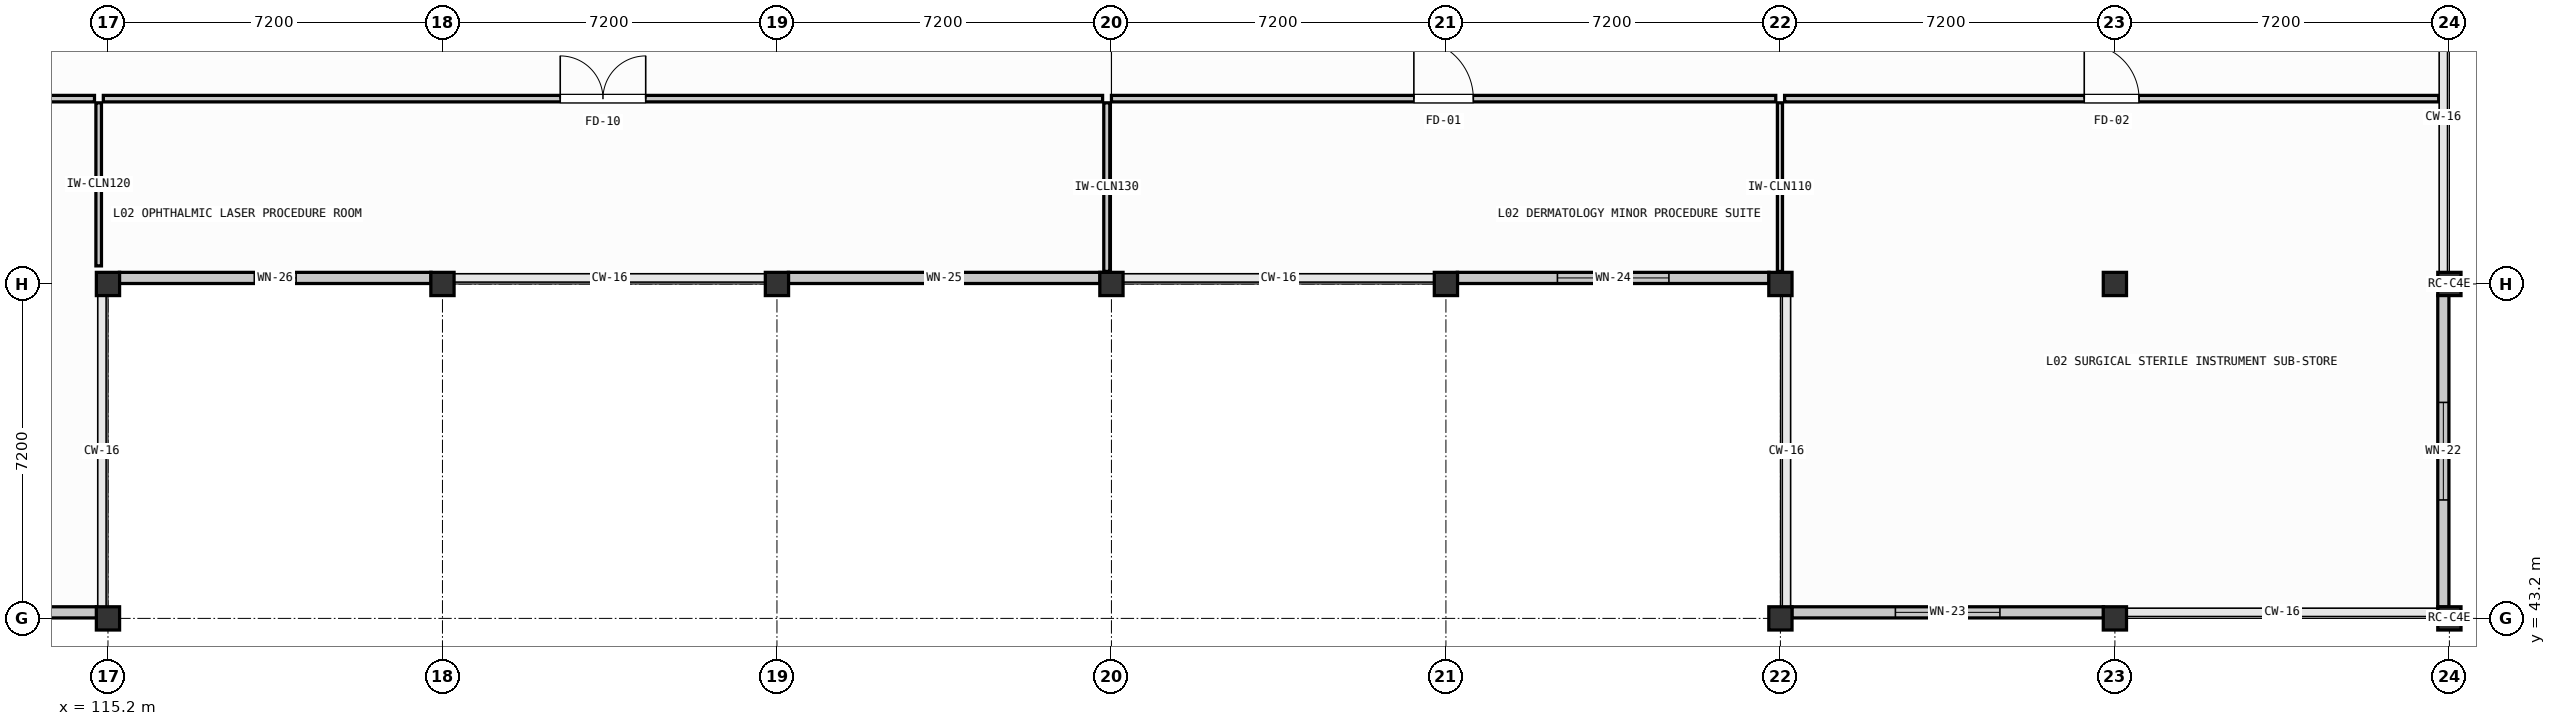
"""IFC4 building model, lengths in metres.
Left out: names, types, materials, properties, quantities, classifications, styles, units other than length and angle.
Written with IfcOpenShell. Run it as: python <this file> out.ifc"""

import sys

from ifc_helpers import new_model, si_unit, direction, frame, frame_2d, origin, origin_2d, place, context, subcontext, project, spatial, rectangle, extrude, element, fill, save


model = new_model("IFC4")
c1 = context("Model", 3, precision=1e-05, world=origin(), true_north=direction((0.0, 1.0)))
c2 = subcontext(c1, "Body", "Model", "MODEL_VIEW")
j1 = project(units=[si_unit("LENGTHUNIT", "METRE"), si_unit("PLANEANGLEUNIT", "RADIAN")], contexts=[c1])
p1 = place(None, origin())
s1 = spatial("IfcSite", under=j1, at=p1, CompositionType="ELEMENT")
p2 = place(p1, origin())
s2 = spatial("IfcBuilding", under=s1, at=p2, CompositionType="ELEMENT")
p3 = place(p2, frame((0.0, 0.0, 4.8)))
s3 = spatial("IfcBuildingStorey", under=s2, at=p3, CompositionType="ELEMENT", Elevation=4.8)
for number, where, z_axis, x_axis in (
    (1, (115.2, 43.2, 0.0), (0.0, 0.0, 1.0), (1.0, 0.0, 0.0)),
    (2, (115.2, 50.4, 0.0), (0.0, 0.0, 1.0), (1.0, 0.0, 0.0)),
    (3, (122.4, 50.4, 0.0), (0.0, 0.0, 1.0), (1.0, 0.0, 0.0)),
    (4, (129.6, 50.4, 0.0), (0.0, 0.0, 1.0), (1.0, 0.0, 0.0)),
    (5, (136.8, 50.4, 0.0), (0.0, 0.0, 1.0), (1.0, 0.0, 0.0)),
    (6, (144.0, 50.4, 0.0), (0.0, 0.0, 1.0), (1.0, 0.0, 0.0)),
    (7, (151.2, 43.2, 0.0), (0.0, 0.0, 1.0), (1.0, 0.0, 0.0)),
    (8, (151.2, 50.4, 0.0), (0.0, 0.0, 1.0), (1.0, 0.0, 0.0)),
    (9, (158.4, 43.2, 0.0), (0.0, 0.0, 1.0), (1.0, 0.0, 0.0)),
    (10, (158.4, 50.4, 0.0), (0.0, 0.0, 1.0), (1.0, 0.0, 0.0)),
    (11, (165.6, 43.2, 0.0), (0.0, 0.0, 1.0), (1.0, 0.0, 0.0)),
    (12, (165.6, 50.4, 0.0), (0.0, 0.0, 1.0), (1.0, 0.0, 0.0)),
):
    element("IfcColumn", number, at=place(p3, frame(where, z_axis=z_axis, x_axis=x_axis)), inside=s3, PredefinedType="COLUMN", context=c2, shape_type="SweptSolid", body=[
        extrude(rectangle(XDim=0.5, YDim=0.5, at=origin_2d()), origin(), (0.0, 0.0, 1.0), 4.2),
    ])
p4 = place(p3, frame((165.47, 50.155, 0.0), z_axis=(0.0, 0.0, 1.0), x_axis=(0.0, -1.0, 0.0)))
e13 = element("IfcWall", 13, at=p4, inside=s3, PredefinedType="SOLIDWALL", context=c2, shape_type="SweptSolid", body=[
    extrude(rectangle(XDim=6.71, YDim=0.24, at=frame_2d((3.355, 0.0))), origin(), (0.0, 0.0, 1.0), 3.4),
])
p5 = place(p4, frame((2.305, 0.0, 1.5)))
e14 = element("IfcOpeningElement", 14, at=p5, cuts=e13, PredefinedType="OPENING", context=c2, shape_type="SweptSolid", body=[
    extrude(rectangle(XDim=2.1, YDim=0.95, at=frame_2d((1.05, 0.475))), frame((0.0, 0.13, 0.0), z_axis=(0.0, -1.0, 0.0), x_axis=(1.0, 0.0, 0.0)), (0.0, 0.0, 1.0), 0.26),
])
p6 = place(p3, frame((158.155, 43.33, 0.0), z_axis=(0.0, 0.0, 1.0), x_axis=(-1.0, 0.0, 0.0)))
e15 = element("IfcWall", 15, at=p6, inside=s3, PredefinedType="SOLIDWALL", context=c2, shape_type="SweptSolid", body=[
    extrude(rectangle(XDim=6.71, YDim=0.24, at=frame_2d((3.355, 0.0))), origin(), (0.0, 0.0, 1.0), 3.4),
])
p7 = place(p6, frame((2.23, 0.0, 1.5)))
e16 = element("IfcOpeningElement", 16, at=p7, cuts=e15, PredefinedType="OPENING", context=c2, shape_type="SweptSolid", body=[
    extrude(rectangle(XDim=2.25, YDim=0.95, at=frame_2d((1.125, 0.475))), frame((0.0, 0.13, 0.0), z_axis=(0.0, -1.0, 0.0), x_axis=(1.0, 0.0, 0.0)), (0.0, 0.0, 1.0), 0.26),
])
p8 = place(p3, frame((150.955, 50.53, 0.0), z_axis=(0.0, 0.0, 1.0), x_axis=(-1.0, 0.0, 0.0)))
e17 = element("IfcWall", 17, at=p8, inside=s3, PredefinedType="SOLIDWALL", context=c2, shape_type="SweptSolid", body=[
    extrude(rectangle(XDim=6.71, YDim=0.24, at=frame_2d((3.355, 0.0))), origin(), (0.0, 0.0, 1.0), 3.4),
])
p9 = place(p8, frame((2.155, 0.0, 1.5)))
e18 = element("IfcOpeningElement", 18, at=p9, cuts=e17, PredefinedType="OPENING", context=c2, shape_type="SweptSolid", body=[
    extrude(rectangle(XDim=2.4, YDim=0.95, at=frame_2d((1.2, 0.475))), frame((0.0, 0.13, 0.0), z_axis=(0.0, -1.0, 0.0), x_axis=(1.0, 0.0, 0.0)), (0.0, 0.0, 1.0), 0.26),
])
p10 = place(p3, frame((136.555, 50.53, 0.0), z_axis=(0.0, 0.0, 1.0), x_axis=(-1.0, 0.0, 0.0)))
e19 = element("IfcWall", 19, at=p10, inside=s3, PredefinedType="SOLIDWALL", context=c2, shape_type="SweptSolid", body=[
    extrude(rectangle(XDim=6.71, YDim=0.24, at=frame_2d((3.355, 0.0))), origin(), (0.0, 0.0, 1.0), 3.4),
])
p11 = place(p10, frame((2.98, 0.0, 0.95)))
e20 = element("IfcOpeningElement", 20, at=p11, cuts=e19, PredefinedType="OPENING", context=c2, shape_type="SweptSolid", body=[
    extrude(rectangle(XDim=0.75, YDim=1.25, at=frame_2d((0.375, 0.625))), frame((0.0, 0.13, 0.0), z_axis=(0.0, -1.0, 0.0), x_axis=(1.0, 0.0, 0.0)), (0.0, 0.0, 1.0), 0.26),
])
p12 = place(p3, frame((122.155, 50.53, 0.0), z_axis=(0.0, 0.0, 1.0), x_axis=(-1.0, 0.0, 0.0)))
e21 = element("IfcWall", 21, at=p12, inside=s3, PredefinedType="SOLIDWALL", context=c2, shape_type="SweptSolid", body=[
    extrude(rectangle(XDim=6.71, YDim=0.24, at=frame_2d((3.355, 0.0))), origin(), (0.0, 0.0, 1.0), 3.4),
])
p13 = place(p12, frame((2.905, 0.0, 0.95)))
e22 = element("IfcOpeningElement", 22, at=p13, cuts=e21, PredefinedType="OPENING", context=c2, shape_type="SweptSolid", body=[
    extrude(rectangle(XDim=0.9, YDim=1.25, at=frame_2d((0.45, 0.625))), frame((0.0, 0.13, 0.0), z_axis=(0.0, -1.0, 0.0), x_axis=(1.0, 0.0, 0.0)), (0.0, 0.0, 1.0), 0.26),
])
p14 = place(p3, frame((114.955, 43.33, 0.0), z_axis=(0.0, 0.0, 1.0), x_axis=(-1.0, 0.0, 0.0)))
e23 = element("IfcWall", 23, at=p14, inside=s3, PredefinedType="SOLIDWALL", context=c2, shape_type="SweptSolid", body=[
    extrude(rectangle(XDim=6.71, YDim=0.24, at=frame_2d((3.355, 0.0))), origin(), (0.0, 0.0, 1.0), 3.4),
])
p15 = place(p14, frame((2.83, 0.0, 0.95)))
e24 = element("IfcOpeningElement", 24, at=p15, cuts=e23, PredefinedType="OPENING", context=c2, shape_type="SweptSolid", body=[
    extrude(rectangle(XDim=1.05, YDim=1.25, at=frame_2d((0.525, 0.625))), frame((0.0, 0.13, 0.0), z_axis=(0.0, -1.0, 0.0), x_axis=(1.0, 0.0, 0.0)), (0.0, 0.0, 1.0), 0.26),
])
p16 = place(p3, frame((101.29, 54.39, 0.0), z_axis=(0.0, 0.0, 1.0), x_axis=(1.0, 0.0, 0.0)))
e25 = element("IfcWall", 25, at=p16, inside=s3, PredefinedType="PARTITIONING", context=c2, shape_type="SweptSolid", body=[
    extrude(rectangle(XDim=13.62, YDim=0.14, at=frame_2d((6.81, 0.0))), origin(), (0.0, 0.0, 1.0), 3.5),
])
p17 = place(p16, frame((5.99, 0.0, 0.0)))
e26 = element("IfcOpeningElement", 26, at=p17, cuts=e25, PredefinedType="OPENING", context=c2, shape_type="SweptSolid", body=[
    extrude(rectangle(XDim=1.64, YDim=2.24, at=frame_2d((0.82, 1.12))), frame((0.0, 0.08, 0.0), z_axis=(0.0, -1.0, 0.0), x_axis=(1.0, 0.0, 0.0)), (0.0, 0.0, 1.0), 0.16),
])
p18 = place(p3, frame((115.0, 54.3, 0.0), z_axis=(0.0, 0.0, 1.0), x_axis=(0.0, -1.0, 0.0)))
e27 = element("IfcWall", 27, at=p18, inside=s3, PredefinedType="PARTITIONING", context=c2, shape_type="SweptSolid", body=[
    extrude(rectangle(XDim=3.511, YDim=0.12, at=frame_2d((1.755, 0.0))), origin(), (0.0, 0.0, 1.0), 3.4),
])
p19 = place(p3, frame((115.1, 54.39, 0.0), z_axis=(0.0, 0.0, 1.0), x_axis=(1.0, 0.0, 0.0)))
e28 = element("IfcWall", 28, at=p19, inside=s3, PredefinedType="PARTITIONING", context=c2, shape_type="SweptSolid", body=[
    extrude(rectangle(XDim=21.51, YDim=0.14, at=frame_2d((10.755, 0.0))), origin(), (0.0, 0.0, 1.0), 3.5),
])
p20 = place(p19, frame((9.835, 0.0, 0.0)))
e29 = element("IfcOpeningElement", 29, at=p20, cuts=e28, PredefinedType="OPENING", context=c2, shape_type="SweptSolid", body=[
    extrude(rectangle(XDim=1.84, YDim=2.28, at=frame_2d((0.92, 1.14))), frame((0.0, 0.08, 0.0), z_axis=(0.0, -1.0, 0.0), x_axis=(1.0, 0.0, 0.0)), (0.0, 0.0, 1.0), 0.16),
])
p21 = place(p3, frame((136.7, 54.3, 0.0), z_axis=(0.0, 0.0, 1.0), x_axis=(0.0, -1.0, 0.0)))
e30 = element("IfcWall", 30, at=p21, inside=s3, PredefinedType="PARTITIONING", context=c2, shape_type="SweptSolid", body=[
    extrude(rectangle(XDim=3.63, YDim=0.13, at=frame_2d((1.815, 0.0))), origin(), (0.0, 0.0, 1.0), 3.4),
])
p22 = place(p3, frame((136.8, 54.39, 0.0), z_axis=(0.0, 0.0, 1.0), x_axis=(1.0, 0.0, 0.0)))
e31 = element("IfcWall", 31, at=p22, inside=s3, PredefinedType="PARTITIONING", context=c2, shape_type="SweptSolid", body=[
    extrude(rectangle(XDim=14.3, YDim=0.14, at=frame_2d((7.15, 0.0))), origin(), (0.0, 0.0, 1.0), 3.5),
])
p23 = place(p22, frame((6.51, 0.0, 0.0)))
e32 = element("IfcOpeningElement", 32, at=p23, cuts=e31, PredefinedType="OPENING", context=c2, shape_type="SweptSolid", body=[
    extrude(rectangle(XDim=1.28, YDim=2.18, at=frame_2d((0.64, 1.09))), frame((0.0, 0.08, 0.0), z_axis=(0.0, -1.0, 0.0), x_axis=(1.0, 0.0, 0.0)), (0.0, 0.0, 1.0), 0.16),
])
p24 = place(p3, frame((151.19, 54.3, 0.0), z_axis=(0.0, 0.0, 1.0), x_axis=(0.0, -1.0, 0.0)))
e33 = element("IfcWall", 33, at=p24, inside=s3, PredefinedType="PARTITIONING", context=c2, shape_type="SweptSolid", body=[
    extrude(rectangle(XDim=3.63, YDim=0.11, at=frame_2d((1.815, 0.0))), origin(), (0.0, 0.0, 1.0), 3.4),
])
p25 = place(p3, frame((151.29, 54.39, 0.0), z_axis=(0.0, 0.0, 1.0), x_axis=(1.0, 0.0, 0.0)))
e34 = element("IfcWall", 34, at=p25, inside=s3, PredefinedType="PARTITIONING", context=c2, shape_type="SweptSolid", body=[
    extrude(rectangle(XDim=14.08, YDim=0.14, at=frame_2d((7.04, 0.0))), origin(), (0.0, 0.0, 1.0), 3.5),
])
p26 = place(p25, frame((6.45, 0.0, 0.0)))
e35 = element("IfcOpeningElement", 35, at=p26, cuts=e34, PredefinedType="OPENING", context=c2, shape_type="SweptSolid", body=[
    extrude(rectangle(XDim=1.18, YDim=2.16, at=frame_2d((0.59, 1.08))), frame((0.0, 0.08, 0.0), z_axis=(0.0, -1.0, 0.0), x_axis=(1.0, 0.0, 0.0)), (0.0, 0.0, 1.0), 0.16),
])
p27 = place(p5, origin())
e36 = element("IfcWindow", 36, at=p27, inside=s3, PartitioningType="SINGLE_PANEL", PredefinedType="WINDOW", context=c2, shape_type="SweptSolid", body=[
    extrude(rectangle(XDim=2.1, YDim=0.95, at=frame_2d((1.05, 0.475))), frame((0.0, 0.03, 0.0), z_axis=(0.0, -1.0, 0.0), x_axis=(1.0, 0.0, 0.0)), (0.0, 0.0, 1.0), 0.06),
])
fill(e14, e36)
p28 = place(p7, origin())
e37 = element("IfcWindow", 37, at=p28, inside=s3, PartitioningType="SINGLE_PANEL", PredefinedType="WINDOW", context=c2, shape_type="SweptSolid", body=[
    extrude(rectangle(XDim=2.25, YDim=0.95, at=frame_2d((1.125, 0.475))), frame((0.0, 0.03, 0.0), z_axis=(0.0, -1.0, 0.0), x_axis=(1.0, 0.0, 0.0)), (0.0, 0.0, 1.0), 0.06),
])
fill(e16, e37)
p29 = place(p9, origin())
e38 = element("IfcWindow", 38, at=p29, inside=s3, PartitioningType="SINGLE_PANEL", PredefinedType="WINDOW", context=c2, shape_type="SweptSolid", body=[
    extrude(rectangle(XDim=2.4, YDim=0.95, at=frame_2d((1.2, 0.475))), frame((0.0, 0.03, 0.0), z_axis=(0.0, -1.0, 0.0), x_axis=(1.0, 0.0, 0.0)), (0.0, 0.0, 1.0), 0.06),
])
fill(e18, e38)
p30 = place(p11, origin())
e39 = element("IfcWindow", 39, at=p30, inside=s3, PartitioningType="SINGLE_PANEL", PredefinedType="WINDOW", context=c2, shape_type="SweptSolid", body=[
    extrude(rectangle(XDim=0.75, YDim=1.25, at=frame_2d((0.375, 0.625))), frame((0.0, 0.03, 0.0), z_axis=(0.0, -1.0, 0.0), x_axis=(1.0, 0.0, 0.0)), (0.0, 0.0, 1.0), 0.06),
])
fill(e20, e39)
p31 = place(p13, origin())
e40 = element("IfcWindow", 40, at=p31, inside=s3, PartitioningType="SINGLE_PANEL", PredefinedType="WINDOW", context=c2, shape_type="SweptSolid", body=[
    extrude(rectangle(XDim=0.9, YDim=1.25, at=frame_2d((0.45, 0.625))), frame((0.0, 0.03, 0.0), z_axis=(0.0, -1.0, 0.0), x_axis=(1.0, 0.0, 0.0)), (0.0, 0.0, 1.0), 0.06),
])
fill(e22, e40)
p32 = place(p20, origin())
e41 = element("IfcDoor", 41, at=p32, inside=s3, OperationType="DOUBLE_DOOR_SINGLE_SWING", PredefinedType="DOOR", context=c2, shape_type="SweptSolid", body=[
    extrude(rectangle(XDim=1.84, YDim=2.28, at=frame_2d((0.92, 1.14))), frame((0.0, 0.025, 0.0), z_axis=(0.0, -1.0, 0.0), x_axis=(1.0, 0.0, 0.0)), (0.0, 0.0, 1.0), 0.05),
])
fill(e29, e41)
p33 = place(p23, origin())
e42 = element("IfcDoor", 42, at=p33, inside=s3, OperationType="SINGLE_SWING_LEFT", PredefinedType="DOOR", context=c2, shape_type="SweptSolid", body=[
    extrude(rectangle(XDim=1.28, YDim=2.18, at=frame_2d((0.64, 1.09))), frame((0.0, 0.025, 0.0), z_axis=(0.0, -1.0, 0.0), x_axis=(1.0, 0.0, 0.0)), (0.0, 0.0, 1.0), 0.05),
])
fill(e32, e42)
p34 = place(p26, origin())
e43 = element("IfcDoor", 43, at=p34, inside=s3, OperationType="SINGLE_SWING_RIGHT", PredefinedType="DOOR", context=c2, shape_type="SweptSolid", body=[
    extrude(rectangle(XDim=1.18, YDim=2.16, at=frame_2d((0.59, 1.08))), frame((0.0, 0.025, 0.0), z_axis=(0.0, -1.0, 0.0), x_axis=(1.0, 0.0, 0.0)), (0.0, 0.0, 1.0), 0.05),
])
fill(e35, e43)
save(model, sys.argv[1])
